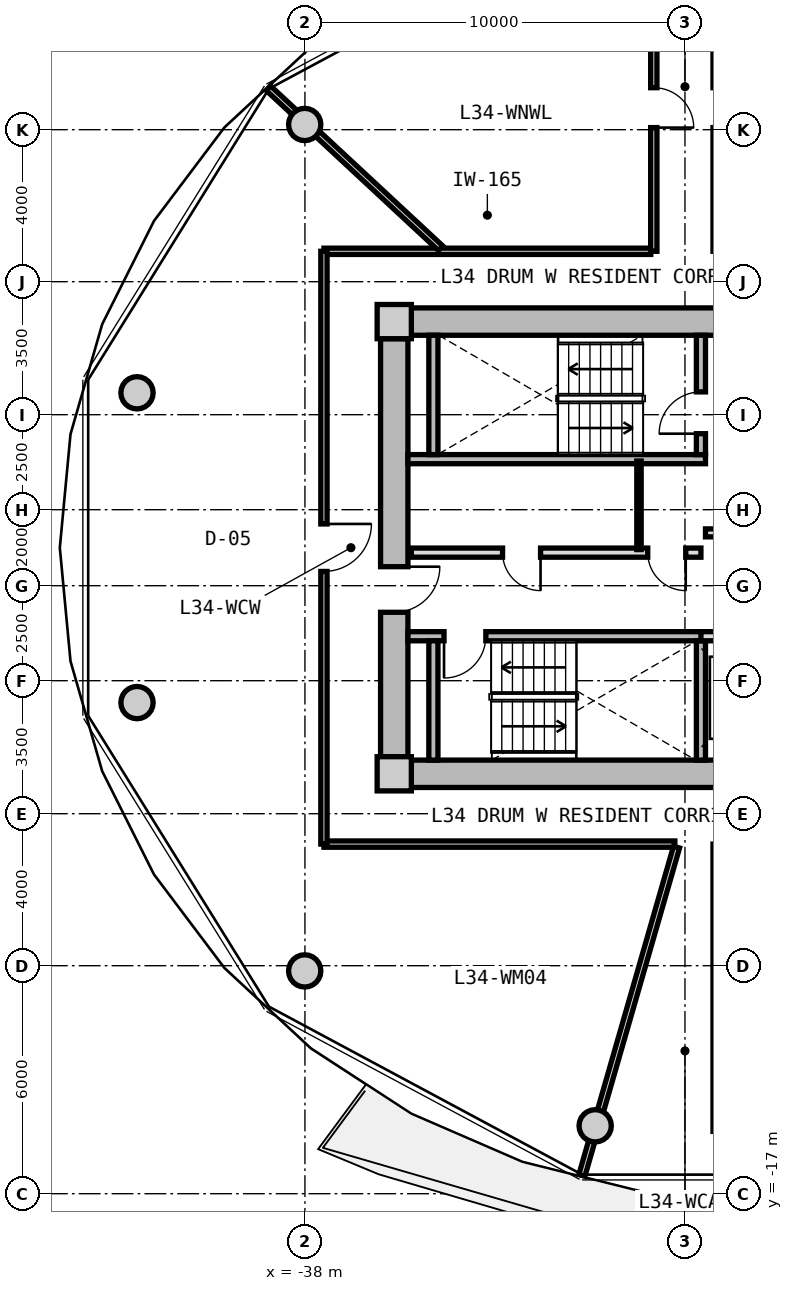
"""IFC4 building model, lengths in metres.
Left out: names, types, materials, properties, quantities, classifications, styles, units other than length and angle.
Written with IfcOpenShell. Run it as: python <this file> out.ifc"""

import sys

from ifc_helpers import new_model, si_unit, direction, frame, frame_2d, origin, origin_2d, place, context, subcontext, project, spatial, rectangle, circle, extrude, source, transform, mapped, element, fill, save


model = new_model("IFC4")
c1 = context("Model", 3, precision=1e-05, world=origin(), true_north=direction((0.0, 1.0)))
c2 = subcontext(c1, "Body", "Model", "MODEL_VIEW")
j1 = project(units=[si_unit("LENGTHUNIT", "METRE"), si_unit("PLANEANGLEUNIT", "RADIAN")], contexts=[c1])
p1 = place(None, origin())
s1 = spatial("IfcSite", under=j1, at=p1, CompositionType="ELEMENT")
p2 = place(p1, origin())
s2 = spatial("IfcBuilding", under=s1, at=p2, CompositionType="ELEMENT")
p3 = place(p2, frame((0.0, 0.0, 111.5)))
s3 = spatial("IfcBuildingStorey", under=s2, at=p3, CompositionType="ELEMENT", Elevation=111.5)
m1 = source(origin(), c2, "Body", "SweptSolid", [
    extrude(rectangle(XDim=0.9, YDim=0.9, at=origin_2d()), origin(), (0.0, 0.0, 1.0), 3.05),
])
for number, where, z_axis, x_axis in (
    (1, (-35.65, -5.95, 0.0), (0.0, 0.0, 1.0), (1.0, 0.0, 0.0)),
    (2, (-35.65, 5.95, 0.0), (0.0, 0.0, 1.0), (1.0, 0.0, 0.0)),
):
    element("IfcColumn", number, at=place(p3, frame(where, z_axis=z_axis, x_axis=x_axis)), inside=s3, PredefinedType="COLUMN", context=c2, shape_type="MappedRepresentation", body=[
        mapped(m1, transform((0.0, 0.0, 0.0), x_axis=(1.0, 0.0, 0.0), y_axis=(0.0, 1.0, 0.0), z_axis=(0.0, 0.0, 1.0), scale=1.0)),
    ])
m2 = source(origin(), c2, "Body", "SweptSolid", [
    extrude(rectangle(XDim=14.4, YDim=0.72, at=frame_2d((7.2, 0.0))), origin(), (0.0, 0.0, 1.0), 2.79),
])
for number, where, z_axis, x_axis in (
    (3, (-35.2, 5.95, 0.0), (0.0, 0.0, 1.0), (1.0, 0.0, 0.0)),
    (4, (-20.8, -5.95, 0.0), (0.0, 0.0, 1.0), (-1.0, 0.0, 0.0)),
):
    element("IfcWall", number, at=place(p3, frame(where, z_axis=z_axis, x_axis=x_axis)), inside=s3, PredefinedType="SHEAR", context=c2, shape_type="MappedRepresentation", body=[
        mapped(m2, transform((0.0, 0.0, 0.0), x_axis=(1.0, 0.0, 0.0), y_axis=(0.0, 1.0, 0.0), z_axis=(0.0, 0.0, 1.0), scale=1.0)),
    ])
m3 = source(origin(), c2, "Body", "SweptSolid", [
    extrude(rectangle(XDim=11.0, YDim=0.72, at=frame_2d((5.5, 0.0))), origin(), (0.0, 0.0, 1.0), 2.79),
])
p4 = place(p3, frame((-35.65, -5.5, 0.0), z_axis=(0.0, 0.0, 1.0), x_axis=(0.0, 1.0, 0.0)))
e5 = element("IfcWall", 5, at=p4, inside=s3, PredefinedType="SHEAR", context=c2, shape_type="MappedRepresentation", body=[
    mapped(m3, transform((0.0, 0.0, 0.0), x_axis=(1.0, 0.0, 0.0), y_axis=(0.0, 1.0, 0.0), z_axis=(0.0, 0.0, 1.0), scale=1.0)),
])
p5 = place(p4, frame((3.8, 0.0, 0.0)))
e6 = element("IfcOpeningElement", 6, at=p5, cuts=e5, PredefinedType="OPENING", context=c2, shape_type="SweptSolid", body=[
    extrude(rectangle(XDim=1.2, YDim=2.15, at=frame_2d((0.6, 1.075))), frame((0.0, 0.37, 0.0), z_axis=(0.0, -1.0, 0.0), x_axis=(1.0, 0.0, 0.0)), (0.0, 0.0, 1.0), 0.74),
])
m4 = source(origin(), c2, "Body", "SweptSolid", [
    extrude(circle(Radius=0.425, at=origin_2d()), origin(), (0.0, 0.0, 1.0), 3.05),
])
for number, where, z_axis, x_axis in (
    (7, (-38.006, 11.137, 0.0), (0.0, 0.0, 1.0), (1.0, 0.0, 0.0)),
    (8, (-42.419, 4.076, 0.0), (0.0, 0.0, 1.0), (1.0, 0.0, 0.0)),
    (9, (-42.419, -4.076, 0.0), (0.0, 0.0, 1.0), (1.0, 0.0, 0.0)),
    (10, (-38.006, -11.137, 0.0), (0.0, 0.0, 1.0), (1.0, 0.0, 0.0)),
    (11, (-30.363, -15.213, 0.0), (0.0, 0.0, 1.0), (1.0, 0.0, 0.0)),
):
    element("IfcColumn", number, at=place(p3, frame(where, z_axis=z_axis, x_axis=x_axis)), inside=s3, PredefinedType="COLUMN", context=c2, shape_type="MappedRepresentation", body=[
        mapped(m4, transform((0.0, 0.0, 0.0), x_axis=(1.0, 0.0, 0.0), y_axis=(0.0, 1.0, 0.0), z_axis=(0.0, 0.0, 1.0), scale=1.0)),
    ])
m5 = source(origin(), c2, "Body", "SweptSolid", [
    extrude(rectangle(XDim=7.83, YDim=0.24, at=frame_2d((3.915, 0.0))), origin(), (0.0, 0.0, 1.0), 2.79),
])
p6 = place(p3, frame((-35.29, 2.33, 0.0), z_axis=(0.0, 0.0, 1.0), x_axis=(1.0, 0.0, 0.0)))
e12 = element("IfcWall", 12, at=p6, inside=s3, PredefinedType="PARTITIONING", context=c2, shape_type="MappedRepresentation", body=[
    mapped(m5, transform((0.0, 0.0, 0.0), x_axis=(1.0, 0.0, 0.0), y_axis=(0.0, 1.0, 0.0), z_axis=(0.0, 0.0, 1.0), scale=1.0)),
])
m6 = source(origin(), c2, "Body", "SweptSolid", [
    extrude(rectangle(XDim=3.14, YDim=0.24, at=frame_2d((1.57, 0.0))), origin(), (0.0, 0.0, 1.0), 2.79),
])
p7 = place(p3, frame((-34.62, 2.45, 0.0), z_axis=(0.0, 0.0, 1.0), x_axis=(0.0, 1.0, 0.0)))
e13 = element("IfcWall", 13, at=p7, inside=s3, PredefinedType="PARTITIONING", context=c2, shape_type="MappedRepresentation", body=[
    mapped(m6, transform((0.0, 0.0, 0.0), x_axis=(1.0, 0.0, 0.0), y_axis=(0.0, 1.0, 0.0), z_axis=(0.0, 0.0, 1.0), scale=1.0)),
])
p8 = place(p3, frame((-27.58, 2.45, 0.0), z_axis=(0.0, 0.0, 1.0), x_axis=(0.0, 1.0, 0.0)))
e14 = element("IfcWall", 14, at=p8, inside=s3, PredefinedType="PARTITIONING", context=c2, shape_type="MappedRepresentation", body=[
    mapped(m6, transform((0.0, 0.0, 0.0), x_axis=(1.0, 0.0, 0.0), y_axis=(0.0, 1.0, 0.0), z_axis=(0.0, 0.0, 1.0), scale=1.0)),
])
p9 = place(p8, frame((0.55, 0.0, 0.0)))
e15 = element("IfcOpeningElement", 15, at=p9, cuts=e14, PredefinedType="OPENING", context=c2, shape_type="SweptSolid", body=[
    extrude(rectangle(XDim=1.1, YDim=2.15, at=frame_2d((0.55, 1.075))), frame((0.0, 0.13, 0.0), z_axis=(0.0, -1.0, 0.0), x_axis=(1.0, 0.0, 0.0)), (0.0, 0.0, 1.0), 0.26),
])
p10 = place(p3, frame((-35.29, -2.33, 0.0), z_axis=(0.0, 0.0, 1.0), x_axis=(1.0, 0.0, 0.0)))
e16 = element("IfcWall", 16, at=p10, inside=s3, PredefinedType="PARTITIONING", context=c2, shape_type="MappedRepresentation", body=[
    mapped(m5, transform((0.0, 0.0, 0.0), x_axis=(1.0, 0.0, 0.0), y_axis=(0.0, 1.0, 0.0), z_axis=(0.0, 0.0, 1.0), scale=1.0)),
])
p11 = place(p10, frame((0.95, 0.0, 0.0)))
e17 = element("IfcOpeningElement", 17, at=p11, cuts=e16, PredefinedType="OPENING", context=c2, shape_type="SweptSolid", body=[
    extrude(rectangle(XDim=1.1, YDim=2.15, at=frame_2d((0.55, 1.075))), frame((0.0, 0.13, 0.0), z_axis=(0.0, -1.0, 0.0), x_axis=(1.0, 0.0, 0.0)), (0.0, 0.0, 1.0), 0.26),
])
for number, where, z_axis, x_axis in (
    (18, (-34.62, -5.59, 0.0), (0.0, 0.0, 1.0), (0.0, 1.0, 0.0)),
    (19, (-27.58, -5.59, 0.0), (0.0, 0.0, 1.0), (0.0, 1.0, 0.0)),
):
    element("IfcWall", number, at=place(p3, frame(where, z_axis=z_axis, x_axis=x_axis)), inside=s3, PredefinedType="PARTITIONING", context=c2, shape_type="MappedRepresentation", body=[
        mapped(m6, transform((0.0, 0.0, 0.0), x_axis=(1.0, 0.0, 0.0), y_axis=(0.0, 1.0, 0.0), z_axis=(0.0, 0.0, 1.0), scale=1.0)),
    ])
m7 = source(origin(), c2, "Body", "SweptSolid", [
    extrude(rectangle(XDim=6.66, YDim=0.21, at=frame_2d((3.33, 0.0))), origin(), (0.0, 0.0, 1.0), 2.775),
])
p12 = place(p3, frame((-27.46, 0.39, 0.0), z_axis=(0.0, 0.0, 1.0), x_axis=(1.0, 0.0, 0.0)))
e20 = element("IfcWall", 20, at=p12, inside=s3, PredefinedType="PARTITIONING", context=c2, shape_type="MappedRepresentation", body=[
    mapped(m7, transform((0.0, 0.0, 0.0), x_axis=(1.0, 0.0, 0.0), y_axis=(0.0, 1.0, 0.0), z_axis=(0.0, 0.0, 1.0), scale=1.0)),
])
p13 = place(p12, frame((1.0, 0.0, 0.0)))
e21 = element("IfcOpeningElement", 21, at=p13, cuts=e20, PredefinedType="OPENING", context=c2, shape_type="SweptSolid", body=[
    extrude(rectangle(XDim=1.2, YDim=2.15, at=frame_2d((0.6, 1.075))), frame((0.0, 0.115, 0.0), z_axis=(0.0, -1.0, 0.0), x_axis=(1.0, 0.0, 0.0)), (0.0, 0.0, 1.0), 0.23),
])
m8 = source(origin(), c2, "Body", "SweptSolid", [
    extrude(rectangle(XDim=7.62, YDim=0.24, at=frame_2d((3.81, 0.0))), origin(), (0.0, 0.0, 1.0), 2.775),
])
p14 = place(p3, frame((-35.2, -0.13, 0.0), z_axis=(0.0, 0.0, 1.0), x_axis=(1.0, 0.0, 0.0)))
e22 = element("IfcWall", 22, at=p14, inside=s3, PredefinedType="PARTITIONING", context=c2, shape_type="MappedRepresentation", body=[
    mapped(m8, transform((0.0, 0.0, 0.0), x_axis=(1.0, 0.0, 0.0), y_axis=(0.0, 1.0, 0.0), z_axis=(0.0, 0.0, 1.0), scale=1.0)),
])
p15 = place(p14, frame((6.22, 0.0, 0.0)))
e23 = element("IfcOpeningElement", 23, at=p15, cuts=e22, PredefinedType="OPENING", context=c2, shape_type="SweptSolid", body=[
    extrude(rectangle(XDim=1.0, YDim=2.1, at=frame_2d((0.5, 1.05))), frame((0.0, 0.13, 0.0), z_axis=(0.0, -1.0, 0.0), x_axis=(1.0, 0.0, 0.0)), (0.0, 0.0, 1.0), 0.26),
])
p16 = place(p14, frame((2.4, 0.0, 0.0)))
e24 = element("IfcOpeningElement", 24, at=p16, cuts=e22, PredefinedType="OPENING", context=c2, shape_type="SweptSolid", body=[
    extrude(rectangle(XDim=1.0, YDim=2.1, at=frame_2d((0.5, 1.05))), frame((0.0, 0.13, 0.0), z_axis=(0.0, -1.0, 0.0), x_axis=(1.0, 0.0, 0.0)), (0.0, 0.0, 1.0), 0.26),
])
m9 = source(origin(), c2, "Body", "SweptSolid", [
    extrude(rectangle(XDim=2.33, YDim=0.115, at=frame_2d((1.165, 0.0))), origin(), (0.0, 0.0, 1.0), 2.775),
])
p17 = place(p3, frame((-29.21, -0.05, 0.0), z_axis=(0.0, 0.0, 1.0), x_axis=(0.0, 1.0, 0.0)))
e25 = element("IfcWall", 25, at=p17, inside=s3, PredefinedType="PARTITIONING", context=c2, shape_type="MappedRepresentation", body=[
    mapped(m9, transform((0.0, 0.0, 0.0), x_axis=(1.0, 0.0, 0.0), y_axis=(0.0, 1.0, 0.0), z_axis=(0.0, 0.0, 1.0), scale=1.0)),
])
m10 = source(origin(), c2, "Body", "SweptSolid", [
    extrude(rectangle(XDim=4.13, YDim=0.24, at=frame_2d((2.065, 0.0))), origin(), (0.0, 0.0, 1.0), 2.775),
])
p18 = place(p3, frame((-27.58, -2.33, 0.0), z_axis=(0.0, 0.0, 1.0), x_axis=(1.0, 0.0, 0.0)))
e26 = element("IfcWall", 26, at=p18, inside=s3, PredefinedType="PARTITIONING", context=c2, shape_type="MappedRepresentation", body=[
    mapped(m10, transform((0.0, 0.0, 0.0), x_axis=(1.0, 0.0, 0.0), y_axis=(0.0, 1.0, 0.0), z_axis=(0.0, 0.0, 1.0), scale=1.0)),
])
p19 = place(p18, frame((0.5, 0.0, 0.0)))
e27 = element("IfcOpeningElement", 27, at=p19, cuts=e26, PredefinedType="OPENING", context=c2, shape_type="SweptSolid", body=[
    extrude(rectangle(XDim=1.1, YDim=2.2, at=frame_2d((0.55, 1.1))), frame((0.0, 0.13, 0.0), z_axis=(0.0, -1.0, 0.0), x_axis=(1.0, 0.0, 0.0)), (0.0, 0.0, 1.0), 0.26),
])
m11 = source(origin(), c2, "Body", "SweptSolid", [
    extrude(rectangle(XDim=8.6, YDim=0.165, at=frame_2d((4.3, 0.0))), origin(), (0.0, 0.0, 1.0), 2.775),
])
p20 = place(p3, frame((-37.5, 7.8, 0.0), z_axis=(0.0, 0.0, 1.0), x_axis=(1.0, 0.0, 0.0)))
e28 = element("IfcWall", 28, at=p20, inside=s3, PredefinedType="PARTITIONING", context=c2, shape_type="MappedRepresentation", body=[
    mapped(m11, transform((0.0, 0.0, 0.0), x_axis=(1.0, 0.0, 0.0), y_axis=(0.0, 1.0, 0.0), z_axis=(0.0, 0.0, 1.0), scale=1.0)),
])
m12 = source(origin(), c2, "Body", "SweptSolid", [
    extrude(rectangle(XDim=9.234, YDim=0.165, at=frame_2d((4.617, 0.0))), origin(), (0.0, 0.0, 1.0), 2.775),
])
p21 = place(p3, frame((-28.266, -7.8, 0.0), z_axis=(0.0, 0.0, 1.0), x_axis=(-1.0, 0.0, 0.0)))
e29 = element("IfcWall", 29, at=p21, inside=s3, PredefinedType="PARTITIONING", context=c2, shape_type="MappedRepresentation", body=[
    mapped(m12, transform((0.0, 0.0, 0.0), x_axis=(1.0, 0.0, 0.0), y_axis=(0.0, 1.0, 0.0), z_axis=(0.0, 0.0, 1.0), scale=1.0)),
])
m13 = source(origin(), c2, "Body", "SweptSolid", [
    extrude(rectangle(XDim=15.6, YDim=0.165, at=frame_2d((7.8, 0.0))), origin(), (0.0, 0.0, 1.0), 2.775),
])
p22 = place(p3, frame((-37.5, -7.8, 0.0), z_axis=(0.0, 0.0, 1.0), x_axis=(0.0, 1.0, 0.0)))
e30 = element("IfcWall", 30, at=p22, inside=s3, PredefinedType="PARTITIONING", context=c2, shape_type="MappedRepresentation", body=[
    mapped(m13, transform((0.0, 0.0, 0.0), x_axis=(1.0, 0.0, 0.0), y_axis=(0.0, 1.0, 0.0), z_axis=(0.0, 0.0, 1.0), scale=1.0)),
])
p23 = place(p22, frame((7.175, 0.0, 0.0)))
e31 = element("IfcOpeningElement", 31, at=p23, cuts=e30, PredefinedType="OPENING", context=c2, shape_type="SweptSolid", body=[
    extrude(rectangle(XDim=1.25, YDim=2.2, at=frame_2d((0.625, 1.1))), frame((0.0, 0.093, 0.0), z_axis=(0.0, -1.0, 0.0), x_axis=(1.0, 0.0, 0.0)), (0.0, 0.0, 1.0), 0.185),
])
m14 = source(origin(), c2, "Body", "SweptSolid", [
    extrude(rectangle(XDim=6.187, YDim=0.165, at=frame_2d((3.093, 0.0))), origin(), (0.0, 0.0, 1.0), 2.275),
])
p24 = place(p3, frame((-34.429, 7.88, 0.0), z_axis=(0.0, 0.0, 1.0), x_axis=(-0.732501077882, 0.680765870841, 0.0)))
e32 = element("IfcWall", 32, at=p24, inside=s3, PredefinedType="PARTITIONING", context=c2, shape_type="MappedRepresentation", body=[
    mapped(m14, transform((0.0, 0.0, 0.0), x_axis=(1.0, 0.0, 0.0), y_axis=(0.0, 1.0, 0.0), z_axis=(0.0, 0.0, 1.0), scale=1.0)),
])
m15 = source(origin(), c2, "Body", "SweptSolid", [
    extrude(rectangle(XDim=8.989, YDim=0.165, at=frame_2d((4.495, 0.0))), origin(), (0.0, 0.0, 1.0), 2.275),
])
p25 = place(p3, frame((-28.222, -7.88, 0.0), z_axis=(0.0, 0.0, 1.0), x_axis=(-0.27702323008, -0.960863221274, 0.0)))
e33 = element("IfcWall", 33, at=p25, inside=s3, PredefinedType="PARTITIONING", context=c2, shape_type="MappedRepresentation", body=[
    mapped(m15, transform((0.0, 0.0, 0.0), x_axis=(1.0, 0.0, 0.0), y_axis=(0.0, 1.0, 0.0), z_axis=(0.0, 0.0, 1.0), scale=1.0)),
])
m16 = source(origin(), c2, "Body", "SweptSolid", [
    extrude(rectangle(XDim=7.56, YDim=0.165, at=frame_2d((3.78, 0.0))), origin(), (0.0, 0.0, 1.0), 2.775),
])
p26 = place(p3, frame((-28.82, 7.8, 0.0), z_axis=(0.0, 0.0, 1.0), x_axis=(0.0, 1.0, 0.0)))
e34 = element("IfcWall", 34, at=p26, inside=s3, PredefinedType="PARTITIONING", context=c2, shape_type="MappedRepresentation", body=[
    mapped(m16, transform((0.0, 0.0, 0.0), x_axis=(1.0, 0.0, 0.0), y_axis=(0.0, 1.0, 0.0), z_axis=(0.0, 0.0, 1.0), scale=1.0)),
])
p27 = place(p26, frame((3.255, 0.0, 0.0)))
e35 = element("IfcOpeningElement", 35, at=p27, cuts=e34, PredefinedType="OPENING", context=c2, shape_type="SweptSolid", body=[
    extrude(rectangle(XDim=1.05, YDim=2.15, at=frame_2d((0.525, 1.075))), frame((0.0, 0.093, 0.0), z_axis=(0.0, -1.0, 0.0), x_axis=(1.0, 0.0, 0.0)), (0.0, 0.0, 1.0), 0.185),
])
m17 = source(origin(), c2, "Body", "SweptSolid", [
    extrude(rectangle(XDim=1.1, YDim=2.15, at=frame_2d((0.55, 1.075))), frame((0.0, 0.025, 0.0), z_axis=(0.0, -1.0, 0.0), x_axis=(1.0, 0.0, 0.0)), (0.0, 0.0, 1.0), 0.05),
])
p28 = place(p9, origin())
e36 = element("IfcDoor", 36, at=p28, inside=s3, OperationType="SINGLE_SWING_LEFT", PredefinedType="DOOR", context=c2, shape_type="MappedRepresentation", body=[
    mapped(m17, transform((0.0, 0.0, 0.0), x_axis=(1.0, 0.0, 0.0), y_axis=(0.0, 1.0, 0.0), z_axis=(0.0, 0.0, 1.0), scale=1.0)),
])
fill(e15, e36)
p29 = place(p11, frame((1.1, 0.0, 0.0), z_axis=(0.0, 0.0, 1.0), x_axis=(-1.0, 0.0, 0.0)))
e37 = element("IfcDoor", 37, at=p29, inside=s3, OperationType="SINGLE_SWING_RIGHT", PredefinedType="DOOR", context=c2, shape_type="MappedRepresentation", body=[
    mapped(m17, transform((0.0, 0.0, 0.0), x_axis=(1.0, 0.0, 0.0), y_axis=(0.0, 1.0, 0.0), z_axis=(0.0, 0.0, 1.0), scale=1.0)),
])
fill(e17, e37)
m18 = source(origin(), c2, "Body", "SweptSolid", [
    extrude(rectangle(XDim=1.2, YDim=2.15, at=frame_2d((0.6, 1.075))), frame((0.0, 0.025, 0.0), z_axis=(0.0, -1.0, 0.0), x_axis=(1.0, 0.0, 0.0)), (0.0, 0.0, 1.0), 0.05),
])
p30 = place(p5, frame((1.2, 0.0, 0.0), z_axis=(0.0, 0.0, 1.0), x_axis=(-1.0, 0.0, 0.0)))
e38 = element("IfcDoor", 38, at=p30, inside=s3, OperationType="SINGLE_SWING_LEFT", PredefinedType="DOOR", context=c2, shape_type="MappedRepresentation", body=[
    mapped(m18, transform((0.0, 0.0, 0.0), x_axis=(1.0, 0.0, 0.0), y_axis=(0.0, 1.0, 0.0), z_axis=(0.0, 0.0, 1.0), scale=1.0)),
])
fill(e6, e38)
m19 = source(origin(), c2, "Body", "SweptSolid", [
    extrude(rectangle(XDim=1.0, YDim=2.1, at=frame_2d((0.5, 1.05))), frame((0.0, 0.025, 0.0), z_axis=(0.0, -1.0, 0.0), x_axis=(1.0, 0.0, 0.0)), (0.0, 0.0, 1.0), 0.05),
])
p31 = place(p15, frame((1.0, 0.0, 0.0), z_axis=(0.0, 0.0, 1.0), x_axis=(-1.0, 0.0, 0.0)))
e39 = element("IfcDoor", 39, at=p31, inside=s3, OperationType="SINGLE_SWING_LEFT", PredefinedType="DOOR", context=c2, shape_type="MappedRepresentation", body=[
    mapped(m19, transform((0.0, 0.0, 0.0), x_axis=(1.0, 0.0, 0.0), y_axis=(0.0, 1.0, 0.0), z_axis=(0.0, 0.0, 1.0), scale=1.0)),
])
fill(e23, e39)
p32 = place(p16, frame((1.0, 0.0, 0.0), z_axis=(0.0, 0.0, 1.0), x_axis=(-1.0, 0.0, 0.0)))
e40 = element("IfcDoor", 40, at=p32, inside=s3, OperationType="SINGLE_SWING_LEFT", PredefinedType="DOOR", context=c2, shape_type="MappedRepresentation", body=[
    mapped(m19, transform((0.0, 0.0, 0.0), x_axis=(1.0, 0.0, 0.0), y_axis=(0.0, 1.0, 0.0), z_axis=(0.0, 0.0, 1.0), scale=1.0)),
])
fill(e24, e40)
m20 = source(origin(), c2, "Body", "SweptSolid", [
    extrude(rectangle(XDim=1.05, YDim=2.15, at=frame_2d((0.525, 1.075))), frame((0.0, 0.025, 0.0), z_axis=(0.0, -1.0, 0.0), x_axis=(1.0, 0.0, 0.0)), (0.0, 0.0, 1.0), 0.05),
])
p33 = place(p27, frame((1.05, 0.0, 0.0), z_axis=(0.0, 0.0, 1.0), x_axis=(-1.0, 0.0, 0.0)))
e41 = element("IfcDoor", 41, at=p33, inside=s3, OperationType="SINGLE_SWING_RIGHT", PredefinedType="DOOR", context=c2, shape_type="MappedRepresentation", body=[
    mapped(m20, transform((0.0, 0.0, 0.0), x_axis=(1.0, 0.0, 0.0), y_axis=(0.0, 1.0, 0.0), z_axis=(0.0, 0.0, 1.0), scale=1.0)),
])
fill(e35, e41)
m21 = source(origin(), c2, "Body", "SweptSolid", [
    extrude(rectangle(XDim=1.25, YDim=2.2, at=frame_2d((0.625, 1.1))), frame((0.0, 0.025, 0.0), z_axis=(0.0, -1.0, 0.0), x_axis=(1.0, 0.0, 0.0)), (0.0, 0.0, 1.0), 0.05),
])
p34 = place(p23, frame((1.25, 0.0, 0.0), z_axis=(0.0, 0.0, 1.0), x_axis=(-1.0, 0.0, 0.0)))
e42 = element("IfcDoor", 42, at=p34, inside=s3, OperationType="SINGLE_SWING_LEFT", PredefinedType="DOOR", context=c2, shape_type="MappedRepresentation", body=[
    mapped(m21, transform((0.0, 0.0, 0.0), x_axis=(1.0, 0.0, 0.0), y_axis=(0.0, 1.0, 0.0), z_axis=(0.0, 0.0, 1.0), scale=1.0)),
])
fill(e31, e42)
save(model, sys.argv[1])
